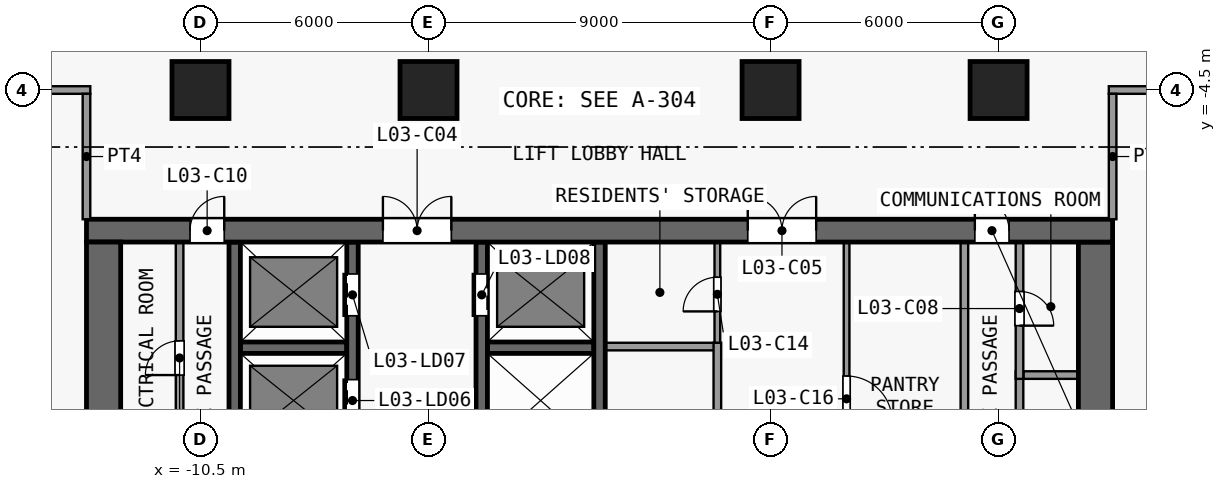
"""IFC4 building model, lengths in metres.
Left out: names, types, materials, properties, quantities, classifications, styles, units other than length and angle.
Written with IfcOpenShell. Run it as: python <this file> out.ifc"""

import sys

from ifc_helpers import new_model, si_unit, direction, frame, frame_2d, origin, origin_2d, place, context, subcontext, project, spatial, rectangle, extrude, element, fill, save


model = new_model("IFC4")
c1 = context("Model", 3, precision=1e-05, world=origin(), true_north=direction((0.0, 1.0)))
c2 = subcontext(c1, "Body", "Model", "MODEL_VIEW")
j1 = project(units=[si_unit("LENGTHUNIT", "METRE"), si_unit("PLANEANGLEUNIT", "RADIAN")], contexts=[c1])
p1 = place(None, origin())
s1 = spatial("IfcSite", under=j1, at=p1, CompositionType="ELEMENT")
p2 = place(p1, origin())
s2 = spatial("IfcBuilding", under=s1, at=p2, CompositionType="ELEMENT")
p3 = place(p2, frame((0.0, 0.0, 18.5)))
s3 = spatial("IfcBuildingStorey", under=s2, at=p3, CompositionType="ELEMENT", Elevation=18.5)
for number, where, z_axis, x_axis in (
    (1, (-10.5, -4.5, 0.0), (0.0, 0.0, 1.0), (1.0, 0.0, 0.0)),
    (2, (-4.5, -4.5, 0.0), (0.0, 0.0, 1.0), (1.0, 0.0, 0.0)),
    (3, (4.5, -4.5, 0.0), (0.0, 0.0, 1.0), (1.0, 0.0, 0.0)),
    (4, (10.5, -4.5, 0.0), (0.0, 0.0, 1.0), (1.0, 0.0, 0.0)),
):
    element("IfcColumn", number, at=place(p3, frame(where, z_axis=z_axis, x_axis=x_axis)), inside=s3, PredefinedType="COLUMN", context=c2, shape_type="SweptSolid", body=[
        extrude(rectangle(XDim=1.5, YDim=1.5, at=origin_2d()), origin(), (0.0, 0.0, 1.0), 5.0),
    ])
p4 = place(p3, frame((-13.5, -8.2, 0.0), z_axis=(0.0, 0.0, 1.0), x_axis=(1.0, 0.0, 0.0)))
e5 = element("IfcWall", 5, at=p4, inside=s3, PredefinedType="SHEAR", context=c2, shape_type="SweptSolid", body=[
    extrude(rectangle(XDim=27.0, YDim=0.6, at=frame_2d((13.5, 0.0))), origin(), (0.0, 0.0, 1.0), 4.65),
])
p5 = place(p4, frame((7.8, 0.0, 0.0)))
e6 = element("IfcOpeningElement", 6, at=p5, cuts=e5, PredefinedType="OPENING", context=c2, shape_type="SweptSolid", body=[
    extrude(rectangle(XDim=1.8, YDim=2.1, at=frame_2d((0.9, 1.05))), frame((0.0, 0.31, 0.0), z_axis=(0.0, -1.0, 0.0), x_axis=(1.0, 0.0, 0.0)), (0.0, 0.0, 1.0), 0.62),
])
p6 = place(p4, frame((17.4, 0.0, 0.0)))
e7 = element("IfcOpeningElement", 7, at=p6, cuts=e5, PredefinedType="OPENING", context=c2, shape_type="SweptSolid", body=[
    extrude(rectangle(XDim=1.8, YDim=2.1, at=frame_2d((0.9, 1.05))), frame((0.0, 0.31, 0.0), z_axis=(0.0, -1.0, 0.0), x_axis=(1.0, 0.0, 0.0)), (0.0, 0.0, 1.0), 0.62),
])
p7 = place(p4, frame((2.725, 0.0, 0.0)))
e8 = element("IfcOpeningElement", 8, at=p7, cuts=e5, PredefinedType="OPENING", context=c2, shape_type="SweptSolid", body=[
    extrude(rectangle(XDim=0.9, YDim=2.1, at=frame_2d((0.45, 1.05))), frame((0.0, 0.31, 0.0), z_axis=(0.0, -1.0, 0.0), x_axis=(1.0, 0.0, 0.0)), (0.0, 0.0, 1.0), 0.62),
])
p8 = place(p4, frame((23.375, 0.0, 0.0)))
e9 = element("IfcOpeningElement", 9, at=p8, cuts=e5, PredefinedType="OPENING", context=c2, shape_type="SweptSolid", body=[
    extrude(rectangle(XDim=0.9, YDim=2.1, at=frame_2d((0.45, 1.05))), frame((0.0, 0.31, 0.0), z_axis=(0.0, -1.0, 0.0), x_axis=(1.0, 0.0, 0.0)), (0.0, 0.0, 1.0), 0.62),
])
p9 = place(p3, frame((-13.05, -8.5, 0.0), z_axis=(0.0, 0.0, 1.0), x_axis=(0.0, -1.0, 0.0)))
e10 = element("IfcWall", 10, at=p9, inside=s3, PredefinedType="SHEAR", context=c2, shape_type="SweptSolid", body=[
    extrude(rectangle(XDim=16.1, YDim=0.9, at=frame_2d((8.05, 0.0))), origin(), (0.0, 0.0, 1.0), 4.65),
])
p10 = place(p9, frame((14.8, 0.0, 0.0)))
e11 = element("IfcOpeningElement", 11, at=p10, cuts=e10, PredefinedType="OPENING", context=c2, shape_type="SweptSolid", body=[
    extrude(rectangle(XDim=1.1, YDim=2.1, at=frame_2d((0.55, 1.05))), frame((0.0, 0.46, 0.0), z_axis=(0.0, -1.0, 0.0), x_axis=(1.0, 0.0, 0.0)), (0.0, 0.0, 1.0), 0.92),
])
p11 = place(p3, frame((13.05, -24.6, 0.0), z_axis=(0.0, 0.0, 1.0), x_axis=(0.0, 1.0, 0.0)))
e12 = element("IfcWall", 12, at=p11, inside=s3, PredefinedType="SHEAR", context=c2, shape_type="SweptSolid", body=[
    extrude(rectangle(XDim=16.1, YDim=0.9, at=frame_2d((8.05, 0.0))), origin(), (0.0, 0.0, 1.0), 4.65),
])
p12 = place(p11, frame((0.2, 0.0, 0.0)))
e13 = element("IfcOpeningElement", 13, at=p12, cuts=e12, PredefinedType="OPENING", context=c2, shape_type="SweptSolid", body=[
    extrude(rectangle(XDim=1.1, YDim=2.1, at=frame_2d((0.55, 1.05))), frame((0.0, 0.46, 0.0), z_axis=(0.0, -1.0, 0.0), x_axis=(1.0, 0.0, 0.0)), (0.0, 0.0, 1.0), 0.92),
])
p13 = place(p3, frame((11.15, -12.0, 0.0), z_axis=(0.0, 0.0, 1.0), x_axis=(1.0, 0.0, 0.0)))
e14 = element("IfcWall", 14, at=p13, inside=s3, PredefinedType="PARTITIONING", context=c2, shape_type="SweptSolid", body=[
    extrude(rectangle(XDim=1.45, YDim=0.2, at=frame_2d((0.725, 0.0))), origin(), (0.0, 0.0, 1.0), 4.65),
])
for number, where, z_axis, x_axis in (
    (15, (-9.45, -11.28, 0.0), (0.0, 0.0, 1.0), (1.0, 0.0, 0.0)),
    (16, (-2.95, -11.28, 0.0), (0.0, 0.0, 1.0), (1.0, 0.0, 0.0)),
):
    element("IfcWall", number, at=place(p3, frame(where, z_axis=z_axis, x_axis=x_axis)), inside=s3, PredefinedType="SHEAR", context=c2, shape_type="SweptSolid", body=[
        extrude(rectangle(XDim=2.8, YDim=0.3, at=frame_2d((1.4, 0.0))), origin(), (0.0, 0.0, 1.0), 4.65),
    ])
p14 = place(p3, frame((0.15, -11.25, 0.0), z_axis=(0.0, 0.0, 1.0), x_axis=(1.0, 0.0, 0.0)))
e17 = element("IfcWall", 17, at=p14, inside=s3, PredefinedType="PARTITIONING", context=c2, shape_type="SweptSolid", body=[
    extrude(rectangle(XDim=3.025, YDim=0.2, at=frame_2d((1.513, 0.0))), origin(), (0.0, 0.0, 1.0), 4.65),
])
p15 = place(p3, frame((-11.05, -14.7, 0.0), z_axis=(0.0, 0.0, 1.0), x_axis=(0.0, 1.0, 0.0)))
e18 = element("IfcWall", 18, at=p15, inside=s3, PredefinedType="PARTITIONING", context=c2, shape_type="SweptSolid", body=[
    extrude(rectangle(XDim=6.2, YDim=0.2, at=frame_2d((3.1, 0.0))), origin(), (0.0, 0.0, 1.0), 4.65),
])
p16 = place(p15, frame((2.7, 0.0, 0.0)))
e19 = element("IfcOpeningElement", 19, at=p16, cuts=e18, PredefinedType="OPENING", context=c2, shape_type="SweptSolid", body=[
    extrude(rectangle(XDim=0.9, YDim=2.1, at=frame_2d((0.45, 1.05))), frame((0.0, 0.11, 0.0), z_axis=(0.0, -1.0, 0.0), x_axis=(1.0, 0.0, 0.0)), (0.0, 0.0, 1.0), 0.22),
])
p17 = place(p3, frame((-9.6, -17.2, 0.0), z_axis=(0.0, 0.0, 1.0), x_axis=(0.0, 1.0, 0.0)))
e20 = element("IfcWall", 20, at=p17, inside=s3, PredefinedType="SHEAR", context=c2, shape_type="SweptSolid", body=[
    extrude(rectangle(XDim=8.7, YDim=0.3, at=frame_2d((4.35, 0.0))), origin(), (0.0, 0.0, 1.0), 4.65),
])
p18 = place(p3, frame((-6.5, -22.5, 0.0), z_axis=(0.0, 0.0, 1.0), x_axis=(0.0, 1.0, 0.0)))
e21 = element("IfcWall", 21, at=p18, inside=s3, PredefinedType="SHEAR", context=c2, shape_type="SweptSolid", body=[
    extrude(rectangle(XDim=14.0, YDim=0.3, at=frame_2d((7.0, 0.0))), origin(), (0.0, 0.0, 1.0), 4.65),
])
p19 = place(p18, frame((0.94, 0.0, 0.0)))
e22 = element("IfcOpeningElement", 22, at=p19, cuts=e21, PredefinedType="OPENING", context=c2, shape_type="SweptSolid", body=[
    extrude(rectangle(XDim=1.1, YDim=2.1, at=frame_2d((0.55, 1.05))), frame((0.0, 0.16, 0.0), z_axis=(0.0, -1.0, 0.0), x_axis=(1.0, 0.0, 0.0)), (0.0, 0.0, 1.0), 0.32),
])
p20 = place(p18, frame((3.72, 0.0, 0.0)))
e23 = element("IfcOpeningElement", 23, at=p20, cuts=e21, PredefinedType="OPENING", context=c2, shape_type="SweptSolid", body=[
    extrude(rectangle(XDim=1.1, YDim=2.1, at=frame_2d((0.55, 1.05))), frame((0.0, 0.16, 0.0), z_axis=(0.0, -1.0, 0.0), x_axis=(1.0, 0.0, 0.0)), (0.0, 0.0, 1.0), 0.32),
])
p21 = place(p18, frame((6.5, 0.0, 0.0)))
e24 = element("IfcOpeningElement", 24, at=p21, cuts=e21, PredefinedType="OPENING", context=c2, shape_type="SweptSolid", body=[
    extrude(rectangle(XDim=1.1, YDim=2.1, at=frame_2d((0.55, 1.05))), frame((0.0, 0.16, 0.0), z_axis=(0.0, -1.0, 0.0), x_axis=(1.0, 0.0, 0.0)), (0.0, 0.0, 1.0), 0.32),
])
p22 = place(p18, frame((9.28, 0.0, 0.0)))
e25 = element("IfcOpeningElement", 25, at=p22, cuts=e21, PredefinedType="OPENING", context=c2, shape_type="SweptSolid", body=[
    extrude(rectangle(XDim=1.1, YDim=2.1, at=frame_2d((0.55, 1.05))), frame((0.0, 0.16, 0.0), z_axis=(0.0, -1.0, 0.0), x_axis=(1.0, 0.0, 0.0)), (0.0, 0.0, 1.0), 0.32),
])
p23 = place(p18, frame((12.06, 0.0, 0.0)))
e26 = element("IfcOpeningElement", 26, at=p23, cuts=e21, PredefinedType="OPENING", context=c2, shape_type="SweptSolid", body=[
    extrude(rectangle(XDim=1.1, YDim=2.1, at=frame_2d((0.55, 1.05))), frame((0.0, 0.16, 0.0), z_axis=(0.0, -1.0, 0.0), x_axis=(1.0, 0.0, 0.0)), (0.0, 0.0, 1.0), 0.32),
])
p24 = place(p3, frame((-3.1, -22.55, 0.0), z_axis=(0.0, 0.0, 1.0), x_axis=(0.0, 1.0, 0.0)))
e27 = element("IfcWall", 27, at=p24, inside=s3, PredefinedType="SHEAR", context=c2, shape_type="SweptSolid", body=[
    extrude(rectangle(XDim=14.05, YDim=0.3, at=frame_2d((7.025, 0.0))), origin(), (0.0, 0.0, 1.0), 4.65),
])
p25 = place(p24, frame((12.11, 0.0, 0.0)))
e28 = element("IfcOpeningElement", 28, at=p25, cuts=e27, PredefinedType="OPENING", context=c2, shape_type="SweptSolid", body=[
    extrude(rectangle(XDim=1.1, YDim=2.1, at=frame_2d((0.55, 1.05))), frame((0.0, 0.16, 0.0), z_axis=(0.0, -1.0, 0.0), x_axis=(1.0, 0.0, 0.0)), (0.0, 0.0, 1.0), 0.32),
])
p26 = place(p24, frame((0.84, 0.0, 0.0)))
e29 = element("IfcOpeningElement", 29, at=p26, cuts=e27, PredefinedType="OPENING", context=c2, shape_type="SweptSolid", body=[
    extrude(rectangle(XDim=1.4, YDim=2.1, at=frame_2d((0.7, 1.05))), frame((0.0, 0.16, 0.0), z_axis=(0.0, -1.0, 0.0), x_axis=(1.0, 0.0, 0.0)), (0.0, 0.0, 1.0), 0.32),
])
p27 = place(p3, frame((0.0, -22.25, 0.0), z_axis=(0.0, 0.0, 1.0), x_axis=(0.0, 1.0, 0.0)))
e30 = element("IfcWall", 30, at=p27, inside=s3, PredefinedType="SHEAR", context=c2, shape_type="SweptSolid", body=[
    extrude(rectangle(XDim=13.75, YDim=0.3, at=frame_2d((6.875, 0.0))), origin(), (0.0, 0.0, 1.0), 4.65),
])
p28 = place(p3, frame((3.1, -19.6, 0.0), z_axis=(0.0, 0.0, 1.0), x_axis=(0.0, 1.0, 0.0)))
e31 = element("IfcWall", 31, at=p28, inside=s3, PredefinedType="PARTITIONING", context=c2, shape_type="SweptSolid", body=[
    extrude(rectangle(XDim=8.45, YDim=0.2, at=frame_2d((4.225, 0.0))), origin(), (0.0, 0.0, 1.0), 4.65),
])
p29 = place(p28, frame((3.625, 0.0, 0.0)))
e32 = element("IfcOpeningElement", 32, at=p29, cuts=e31, PredefinedType="OPENING", context=c2, shape_type="SweptSolid", body=[
    extrude(rectangle(XDim=1.2, YDim=2.1, at=frame_2d((0.6, 1.05))), frame((0.0, 0.11, 0.0), z_axis=(0.0, -1.0, 0.0), x_axis=(1.0, 0.0, 0.0)), (0.0, 0.0, 1.0), 0.22),
])
p30 = place(p3, frame((3.1, -11.15, 0.0), z_axis=(0.0, 0.0, 1.0), x_axis=(0.0, 1.0, 0.0)))
e33 = element("IfcWall", 33, at=p30, inside=s3, PredefinedType="PARTITIONING", context=c2, shape_type="SweptSolid", body=[
    extrude(rectangle(XDim=2.65, YDim=0.15, at=frame_2d((1.325, 0.0))), origin(), (0.0, 0.0, 1.0), 4.65),
])
p31 = place(p30, frame((0.825, 0.0, 0.0)))
e34 = element("IfcOpeningElement", 34, at=p31, cuts=e33, PredefinedType="OPENING", context=c2, shape_type="SweptSolid", body=[
    extrude(rectangle(XDim=0.9, YDim=2.1, at=frame_2d((0.45, 1.05))), frame((0.0, 0.085, 0.0), z_axis=(0.0, -1.0, 0.0), x_axis=(1.0, 0.0, 0.0)), (0.0, 0.0, 1.0), 0.17),
])
p32 = place(p3, frame((6.5, -8.5, 0.0), z_axis=(0.0, 0.0, 1.0), x_axis=(0.0, -1.0, 0.0)))
e35 = element("IfcWall", 35, at=p32, inside=s3, PredefinedType="PARTITIONING", context=c2, shape_type="SweptSolid", body=[
    extrude(rectangle(XDim=10.85, YDim=0.15, at=frame_2d((5.425, 0.0))), origin(), (0.0, 0.0, 1.0), 4.65),
])
p33 = place(p32, frame((9.175, 0.0, 0.0)))
e36 = element("IfcOpeningElement", 36, at=p33, cuts=e35, PredefinedType="OPENING", context=c2, shape_type="SweptSolid", body=[
    extrude(rectangle(XDim=0.9, YDim=2.1, at=frame_2d((0.45, 1.05))), frame((0.0, 0.085, 0.0), z_axis=(0.0, -1.0, 0.0), x_axis=(1.0, 0.0, 0.0)), (0.0, 0.0, 1.0), 0.17),
])
p34 = place(p32, frame((3.525, 0.0, 0.0)))
e37 = element("IfcOpeningElement", 37, at=p34, cuts=e35, PredefinedType="OPENING", context=c2, shape_type="SweptSolid", body=[
    extrude(rectangle(XDim=1.2, YDim=2.1, at=frame_2d((0.6, 1.05))), frame((0.0, 0.085, 0.0), z_axis=(0.0, -1.0, 0.0), x_axis=(1.0, 0.0, 0.0)), (0.0, 0.0, 1.0), 0.17),
])
p35 = place(p3, frame((9.6, -16.9, 0.0), z_axis=(0.0, 0.0, 1.0), x_axis=(0.0, 1.0, 0.0)))
e38 = element("IfcWall", 38, at=p35, inside=s3, PredefinedType="PARTITIONING", context=c2, shape_type="SweptSolid", body=[
    extrude(rectangle(XDim=8.4, YDim=0.2, at=frame_2d((4.2, 0.0))), origin(), (0.0, 0.0, 1.0), 4.65),
])
p36 = place(p3, frame((11.05, -11.9, 0.0), z_axis=(0.0, 0.0, 1.0), x_axis=(0.0, -1.0, 0.0)))
e39 = element("IfcWall", 39, at=p36, inside=s3, PredefinedType="PARTITIONING", context=c2, shape_type="SweptSolid", body=[
    extrude(rectangle(XDim=5.0, YDim=0.2, at=frame_2d((2.5, 0.0))), origin(), (0.0, 0.0, 1.0), 4.65),
])
p37 = place(p36, frame((2.175, 0.0, 0.0)))
e40 = element("IfcOpeningElement", 40, at=p37, cuts=e39, PredefinedType="OPENING", context=c2, shape_type="SweptSolid", body=[
    extrude(rectangle(XDim=0.9, YDim=2.1, at=frame_2d((0.45, 1.05))), frame((0.0, 0.11, 0.0), z_axis=(0.0, -1.0, 0.0), x_axis=(1.0, 0.0, 0.0)), (0.0, 0.0, 1.0), 0.22),
])
p38 = place(p3, frame((11.05, -8.5, 0.0), z_axis=(0.0, 0.0, 1.0), x_axis=(0.0, -1.0, 0.0)))
e41 = element("IfcWall", 41, at=p38, inside=s3, PredefinedType="PARTITIONING", context=c2, shape_type="SweptSolid", body=[
    extrude(rectangle(XDim=3.6, YDim=0.2, at=frame_2d((1.8, 0.0))), origin(), (0.0, 0.0, 1.0), 4.65),
])
p39 = place(p38, frame((1.3, 0.0, 0.0)))
e42 = element("IfcOpeningElement", 42, at=p39, cuts=e41, PredefinedType="OPENING", context=c2, shape_type="SweptSolid", body=[
    extrude(rectangle(XDim=0.9, YDim=2.1, at=frame_2d((0.45, 1.05))), frame((0.0, 0.11, 0.0), z_axis=(0.0, -1.0, 0.0), x_axis=(1.0, 0.0, 0.0)), (0.0, 0.0, 1.0), 0.22),
])
p40 = place(p3, frame((-31.6, -4.5, 0.0), z_axis=(0.0, 0.0, 1.0), x_axis=(1.0, 0.0, 0.0)))
e43 = element("IfcWall", 43, at=p40, inside=s3, PredefinedType="PARTITIONING", context=c2, shape_type="SweptSolid", body=[
    extrude(rectangle(XDim=18.2, YDim=0.2, at=frame_2d((9.1, 0.0))), origin(), (0.0, 0.0, 1.0), 4.65),
])
p41 = place(p40, frame((3.2, 0.0, 0.0)))
e44 = element("IfcOpeningElement", 44, at=p41, cuts=e43, PredefinedType="OPENING", context=c2, shape_type="SweptSolid", body=[
    extrude(rectangle(XDim=1.0, YDim=2.1, at=frame_2d((0.5, 1.05))), frame((0.0, 0.11, 0.0), z_axis=(0.0, -1.0, 0.0), x_axis=(1.0, 0.0, 0.0)), (0.0, 0.0, 1.0), 0.22),
])
p42 = place(p40, frame((13.2, 0.0, 0.0)))
e45 = element("IfcOpeningElement", 45, at=p42, cuts=e43, PredefinedType="OPENING", context=c2, shape_type="SweptSolid", body=[
    extrude(rectangle(XDim=1.0, YDim=2.1, at=frame_2d((0.5, 1.05))), frame((0.0, 0.11, 0.0), z_axis=(0.0, -1.0, 0.0), x_axis=(1.0, 0.0, 0.0)), (0.0, 0.0, 1.0), 0.22),
])
p43 = place(p3, frame((13.4, -4.5, 0.0), z_axis=(0.0, 0.0, 1.0), x_axis=(1.0, 0.0, 0.0)))
e46 = element("IfcWall", 46, at=p43, inside=s3, PredefinedType="PARTITIONING", context=c2, shape_type="SweptSolid", body=[
    extrude(rectangle(XDim=15.2, YDim=0.2, at=frame_2d((7.6, 0.0))), origin(), (0.0, 0.0, 1.0), 4.65),
])
p44 = place(p43, frame((7.1, 0.0, 0.0)))
e47 = element("IfcOpeningElement", 47, at=p44, cuts=e46, PredefinedType="OPENING", context=c2, shape_type="SweptSolid", body=[
    extrude(rectangle(XDim=1.0, YDim=2.1, at=frame_2d((0.5, 1.05))), frame((0.0, 0.11, 0.0), z_axis=(0.0, -1.0, 0.0), x_axis=(1.0, 0.0, 0.0)), (0.0, 0.0, 1.0), 0.22),
])
for number, where, z_axis, x_axis in (
    (48, (-13.5, -7.9, 0.0), (0.0, 0.0, 1.0), (0.0, 1.0, 0.0)),
    (49, (13.5, -7.9, 0.0), (0.0, 0.0, 1.0), (0.0, 1.0, 0.0)),
):
    element("IfcWall", number, at=place(p3, frame(where, z_axis=z_axis, x_axis=x_axis)), inside=s3, PredefinedType="PARTITIONING", context=c2, shape_type="SweptSolid", body=[
        extrude(rectangle(XDim=3.3, YDim=0.2, at=frame_2d((1.65, 0.0))), origin(), (0.0, 0.0, 1.0), 4.65),
    ])
p45 = place(p22, origin())
e50 = element("IfcDoor", 50, at=p45, inside=s3, OperationType="DOUBLE_DOOR_SLIDING", PredefinedType="DOOR", context=c2, shape_type="SweptSolid", body=[
    extrude(rectangle(XDim=1.1, YDim=2.1, at=frame_2d((0.55, 1.05))), frame((0.0, 0.025, 0.0), z_axis=(0.0, -1.0, 0.0), x_axis=(1.0, 0.0, 0.0)), (0.0, 0.0, 1.0), 0.05),
])
fill(e25, e50)
p46 = place(p23, origin())
e51 = element("IfcDoor", 51, at=p46, inside=s3, OperationType="DOUBLE_DOOR_SLIDING", PredefinedType="DOOR", context=c2, shape_type="SweptSolid", body=[
    extrude(rectangle(XDim=1.1, YDim=2.1, at=frame_2d((0.55, 1.05))), frame((0.0, 0.025, 0.0), z_axis=(0.0, -1.0, 0.0), x_axis=(1.0, 0.0, 0.0)), (0.0, 0.0, 1.0), 0.05),
])
fill(e26, e51)
p47 = place(p25, origin())
e52 = element("IfcDoor", 52, at=p47, inside=s3, OperationType="DOUBLE_DOOR_SLIDING", PredefinedType="DOOR", context=c2, shape_type="SweptSolid", body=[
    extrude(rectangle(XDim=1.1, YDim=2.1, at=frame_2d((0.55, 1.05))), frame((0.0, 0.025, 0.0), z_axis=(0.0, -1.0, 0.0), x_axis=(1.0, 0.0, 0.0)), (0.0, 0.0, 1.0), 0.05),
])
fill(e28, e52)
p48 = place(p5, origin())
e53 = element("IfcDoor", 53, at=p48, inside=s3, OperationType="DOUBLE_DOOR_SINGLE_SWING", PredefinedType="DOOR", context=c2, shape_type="SweptSolid", body=[
    extrude(rectangle(XDim=1.8, YDim=2.1, at=frame_2d((0.9, 1.05))), frame((0.0, 0.025, 0.0), z_axis=(0.0, -1.0, 0.0), x_axis=(1.0, 0.0, 0.0)), (0.0, 0.0, 1.0), 0.05),
])
fill(e6, e53)
p49 = place(p6, origin())
e54 = element("IfcDoor", 54, at=p49, inside=s3, OperationType="DOUBLE_DOOR_SINGLE_SWING", PredefinedType="DOOR", context=c2, shape_type="SweptSolid", body=[
    extrude(rectangle(XDim=1.8, YDim=2.1, at=frame_2d((0.9, 1.05))), frame((0.0, 0.025, 0.0), z_axis=(0.0, -1.0, 0.0), x_axis=(1.0, 0.0, 0.0)), (0.0, 0.0, 1.0), 0.05),
])
fill(e7, e54)
p50 = place(p16, origin())
e55 = element("IfcDoor", 55, at=p50, inside=s3, OperationType="SINGLE_SWING_LEFT", PredefinedType="DOOR", context=c2, shape_type="SweptSolid", body=[
    extrude(rectangle(XDim=0.9, YDim=2.1, at=frame_2d((0.45, 1.05))), frame((0.0, 0.025, 0.0), z_axis=(0.0, -1.0, 0.0), x_axis=(1.0, 0.0, 0.0)), (0.0, 0.0, 1.0), 0.05),
])
fill(e19, e55)
p51 = place(p39, origin())
e56 = element("IfcDoor", 56, at=p51, inside=s3, OperationType="SINGLE_SWING_RIGHT", PredefinedType="DOOR", context=c2, shape_type="SweptSolid", body=[
    extrude(rectangle(XDim=0.9, YDim=2.1, at=frame_2d((0.45, 1.05))), frame((0.0, 0.025, 0.0), z_axis=(0.0, -1.0, 0.0), x_axis=(1.0, 0.0, 0.0)), (0.0, 0.0, 1.0), 0.05),
])
fill(e42, e56)
p52 = place(p7, origin())
e57 = element("IfcDoor", 57, at=p52, inside=s3, OperationType="SINGLE_SWING_RIGHT", PredefinedType="DOOR", context=c2, shape_type="SweptSolid", body=[
    extrude(rectangle(XDim=0.9, YDim=2.1, at=frame_2d((0.45, 1.05))), frame((0.0, 0.025, 0.0), z_axis=(0.0, -1.0, 0.0), x_axis=(1.0, 0.0, 0.0)), (0.0, 0.0, 1.0), 0.05),
])
fill(e8, e57)
p53 = place(p8, origin())
e58 = element("IfcDoor", 58, at=p53, inside=s3, OperationType="SINGLE_SWING_LEFT", PredefinedType="DOOR", context=c2, shape_type="SweptSolid", body=[
    extrude(rectangle(XDim=0.9, YDim=2.1, at=frame_2d((0.45, 1.05))), frame((0.0, 0.025, 0.0), z_axis=(0.0, -1.0, 0.0), x_axis=(1.0, 0.0, 0.0)), (0.0, 0.0, 1.0), 0.05),
])
fill(e9, e58)
p54 = place(p31, origin())
e59 = element("IfcDoor", 59, at=p54, inside=s3, OperationType="SINGLE_SWING_LEFT", PredefinedType="DOOR", context=c2, shape_type="SweptSolid", body=[
    extrude(rectangle(XDim=0.9, YDim=2.1, at=frame_2d((0.45, 1.05))), frame((0.0, 0.025, 0.0), z_axis=(0.0, -1.0, 0.0), x_axis=(1.0, 0.0, 0.0)), (0.0, 0.0, 1.0), 0.05),
])
fill(e34, e59)
p55 = place(p34, origin())
e60 = element("IfcDoor", 60, at=p55, inside=s3, OperationType="SINGLE_SWING_RIGHT", PredefinedType="DOOR", context=c2, shape_type="SweptSolid", body=[
    extrude(rectangle(XDim=1.2, YDim=2.1, at=frame_2d((0.6, 1.05))), frame((0.0, 0.025, 0.0), z_axis=(0.0, -1.0, 0.0), x_axis=(1.0, 0.0, 0.0)), (0.0, 0.0, 1.0), 0.05),
])
fill(e37, e60)
save(model, sys.argv[1])
